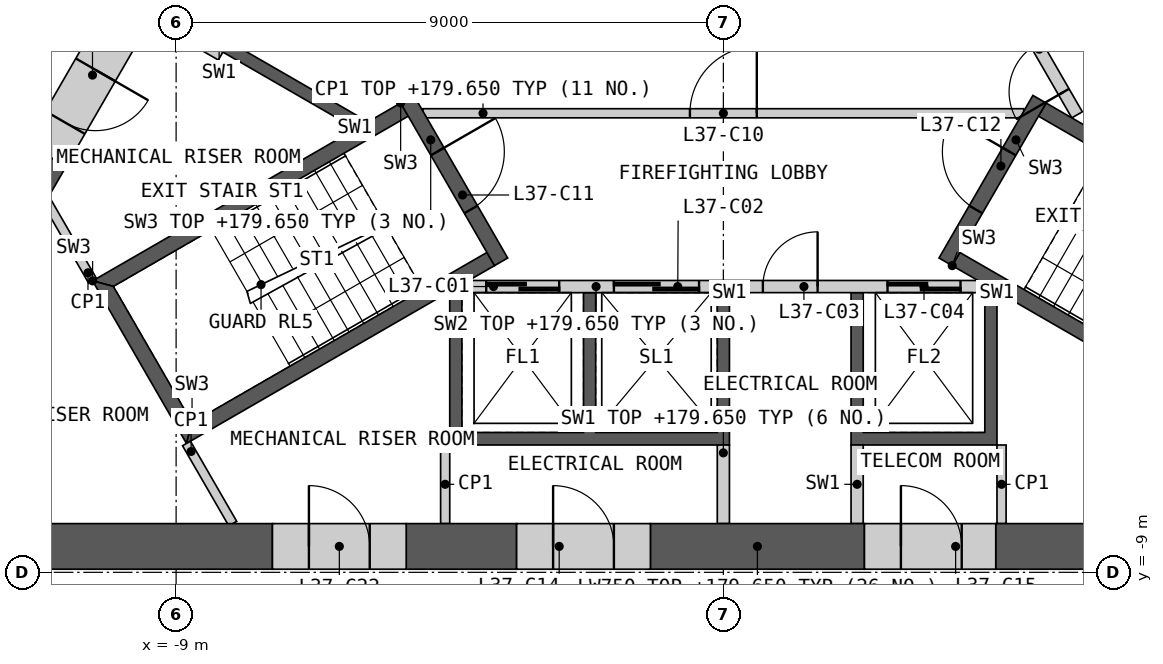
"""IFC4 building model, lengths in metres.
Left out: names, types, materials, properties, quantities, classifications, styles, units other than length and angle.
Written with IfcOpenShell. Run it as: python <this file> out.ifc"""

import sys

from ifc_helpers import new_model, si_unit, direction, frame, frame_2d, origin, place, context, subcontext, project, spatial, polyline, rectangle, outline, extrude, element, fill, save


model = new_model("IFC4")
c1 = context("Model", 3, precision=1e-05, world=origin(), true_north=direction((0.0, 1.0)))
c2 = subcontext(c1, "Body", "Model", "MODEL_VIEW")
j1 = project(units=[si_unit("LENGTHUNIT", "METRE"), si_unit("PLANEANGLEUNIT", "RADIAN")], contexts=[c1])
p1 = place(None, origin())
s1 = spatial("IfcSite", under=j1, at=p1, CompositionType="ELEMENT")
p2 = place(p1, origin())
s2 = spatial("IfcBuilding", under=s1, at=p2, CompositionType="ELEMENT")
p3 = place(p2, frame((0.0, 0.0, 176.4)))
s3 = spatial("IfcBuildingStorey", under=s2, at=p3, CompositionType="ELEMENT", Elevation=176.4)
p4 = place(p3, origin())
e1 = element("IfcWall", 1, at=p4, inside=s3, PredefinedType="SHEAR", context=c2, shape_type="SweptSolid", body=[
    extrude(outline(polyline([(4.5, -4.4), (4.5, -6.906), (2.1, -6.906), (2.1, -4.4), (2.3, -4.4), (2.3, -6.7), (4.3, -6.7), (4.3, -4.4), (4.5, -4.4)])), origin(), (0.0, 0.0, 1.0), 3.25),
])
p5 = place(p3, origin())
e2 = element("IfcWall", 2, at=p5, inside=s3, PredefinedType="SHEAR", context=c2, shape_type="SweptSolid", body=[
    extrude(outline(polyline([(0.1, -4.4), (0.1, -6.906), (-4.5, -6.906), (-4.5, -4.4), (-4.3, -4.4), (-4.3, -6.7), (-2.3, -6.7), (-2.3, -4.4), (-2.1, -4.4), (-2.1, -6.7), (-0.1, -6.7), (-0.1, -4.4), (0.1, -4.4)])), origin(), (0.0, 0.0, 1.0), 3.25),
])
p6 = place(p3, frame((-4.187, -4.3, 0.0), z_axis=(0.0, 0.0, 1.0), x_axis=(1.0, 0.0, 0.0)))
e3 = element("IfcWall", 3, at=p6, inside=s3, PredefinedType="SOLIDWALL", context=c2, shape_type="SweptSolid", body=[
    extrude(rectangle(XDim=8.373, YDim=0.2, at=frame_2d((4.187, 0.0))), origin(), (0.0, 0.0, 1.0), 3.25),
])
p7 = place(p6, frame((0.287, 0.0, 0.0)))
e4 = element("IfcOpeningElement", 4, at=p7, cuts=e3, PredefinedType="OPENING", context=c2, shape_type="SweptSolid", body=[
    extrude(rectangle(XDim=1.2, YDim=2.1, at=frame_2d((0.6, 1.05))), frame((0.0, 0.11, 0.0), z_axis=(0.0, -1.0, 0.0), x_axis=(1.0, 0.0, 0.0)), (0.0, 0.0, 1.0), 0.22),
])
p8 = place(p6, frame((2.387, 0.0, 0.0)))
e5 = element("IfcOpeningElement", 5, at=p8, cuts=e3, PredefinedType="OPENING", context=c2, shape_type="SweptSolid", body=[
    extrude(rectangle(XDim=1.4, YDim=2.1, at=frame_2d((0.7, 1.05))), frame((0.0, 0.11, 0.0), z_axis=(0.0, -1.0, 0.0), x_axis=(1.0, 0.0, 0.0)), (0.0, 0.0, 1.0), 0.22),
])
p9 = place(p6, frame((4.837, 0.0, 0.0)))
e6 = element("IfcOpeningElement", 6, at=p9, cuts=e3, PredefinedType="OPENING", context=c2, shape_type="SweptSolid", body=[
    extrude(rectangle(XDim=0.9, YDim=2.1, at=frame_2d((0.45, 1.05))), frame((0.0, 0.11, 0.0), z_axis=(0.0, -1.0, 0.0), x_axis=(1.0, 0.0, 0.0)), (0.0, 0.0, 1.0), 0.22),
])
p10 = place(p6, frame((6.887, 0.0, 0.0)))
e7 = element("IfcOpeningElement", 7, at=p10, cuts=e3, PredefinedType="OPENING", context=c2, shape_type="SweptSolid", body=[
    extrude(rectangle(XDim=1.2, YDim=2.1, at=frame_2d((0.6, 1.05))), frame((0.0, 0.11, 0.0), z_axis=(0.0, -1.0, 0.0), x_axis=(1.0, 0.0, 0.0)), (0.0, 0.0, 1.0), 0.22),
])
for number, where, z_axis, x_axis in (
    (8, (0.0, -6.906, 0.0), (0.0, 0.0, 1.0), (0.0, -1.0, 0.0)),
    (9, (2.2, -6.906, 0.0), (0.0, 0.0, 1.0), (0.0, -1.0, 0.0)),
):
    element("IfcWall", number, at=place(p3, frame(where, z_axis=z_axis, x_axis=x_axis)), inside=s3, PredefinedType="SHEAR", context=c2, shape_type="SweptSolid", body=[
        extrude(rectangle(XDim=1.293, YDim=0.2, at=frame_2d((0.646, 0.0))), origin(), (0.0, 0.0, 1.0), 3.25),
    ])
p11 = place(p3, frame((5.817, -1.476, 0.0), z_axis=(0.0, 0.0, 1.0), x_axis=(-0.500002616675, 0.866023893041, 0.0)))
e10 = element("IfcWall", 10, at=p11, inside=s3, PredefinedType="SOLIDWALL", context=c2, shape_type="SweptSolid", body=[
    extrude(rectangle(XDim=8.373, YDim=0.2, at=frame_2d((4.187, 0.0))), origin(), (0.0, 0.0, 1.0), 3.25),
])
p12 = place(p11, frame((0.437, 0.0, 0.0)))
e11 = element("IfcOpeningElement", 11, at=p12, cuts=e10, PredefinedType="OPENING", context=c2, shape_type="SweptSolid", body=[
    extrude(rectangle(XDim=0.9, YDim=2.1, at=frame_2d((0.45, 1.05))), frame((0.0, 0.11, 0.0), z_axis=(0.0, -1.0, 0.0), x_axis=(1.0, 0.0, 0.0)), (0.0, 0.0, 1.0), 0.22),
])
p13 = place(p11, frame((3.737, 0.0, 0.0)))
e12 = element("IfcOpeningElement", 12, at=p13, cuts=e10, PredefinedType="OPENING", context=c2, shape_type="SweptSolid", body=[
    extrude(rectangle(XDim=0.9, YDim=2.1, at=frame_2d((0.45, 1.05))), frame((0.0, 0.11, 0.0), z_axis=(0.0, -1.0, 0.0), x_axis=(1.0, 0.0, 0.0)), (0.0, 0.0, 1.0), 0.22),
])
p14 = place(p11, frame((6.937, 0.0, 0.0)))
e13 = element("IfcOpeningElement", 13, at=p14, cuts=e10, PredefinedType="OPENING", context=c2, shape_type="SweptSolid", body=[
    extrude(rectangle(XDim=1.1, YDim=2.1, at=frame_2d((0.55, 1.05))), frame((0.0, 0.11, 0.0), z_axis=(0.0, -1.0, 0.0), x_axis=(1.0, 0.0, 0.0)), (0.0, 0.0, 1.0), 0.22),
])
p15 = place(p3, origin())
e14 = element("IfcWall", 14, at=p15, inside=s3, PredefinedType="SHEAR", context=c2, shape_type="SweptSolid", body=[
    extrude(outline(polyline([(-6.061, -1.697), (-8.231, -0.444), (-8.131, -0.271), (-5.96, -1.524), (-6.061, -1.697)])), origin(), (0.0, 0.0, 1.0), 3.25),
])
p16 = place(p3, frame((-4.941, -1.45, 0.0), z_axis=(0.0, 0.0, 1.0), x_axis=(1.0, 0.0, 0.0)))
e15 = element("IfcWall", 15, at=p16, inside=s3, PredefinedType="PARTITIONING", context=c2, shape_type="SweptSolid", body=[
    extrude(rectangle(XDim=9.882, YDim=0.15, at=frame_2d((4.941, 0.0))), origin(), (0.0, 0.0, 1.0), 3.25),
])
p17 = place(p16, frame((4.391, 0.0, 0.0)))
e16 = element("IfcOpeningElement", 16, at=p17, cuts=e15, PredefinedType="OPENING", context=c2, shape_type="SweptSolid", body=[
    extrude(rectangle(XDim=1.1, YDim=2.1, at=frame_2d((0.55, 1.05))), frame((0.0, 0.085, 0.0), z_axis=(0.0, -1.0, 0.0), x_axis=(1.0, 0.0, 0.0)), (0.0, 0.0, 1.0), 0.17),
])
p18 = place(p3, origin())
e17 = element("IfcWall", 17, at=p18, inside=s3, PredefinedType="SHEAR", context=c2, shape_type="SweptSolid", body=[
    extrude(outline(polyline([(-5.307, -1.281), (-10.374, -4.206), (-10.032, -4.298), (-5.182, -1.498), (-5.307, -1.281)])), origin(), (0.0, 0.0, 1.0), 3.25),
])
p19 = place(p3, origin())
e18 = element("IfcWall", 18, at=p19, inside=s3, PredefinedType="SHEAR", context=c2, shape_type="SweptSolid", body=[
    extrude(outline(polyline([(-10.374, -4.206), (-8.83, -6.881), (-8.738, -6.539), (-10.032, -4.298), (-10.374, -4.206)])), origin(), (0.0, 0.0, 1.0), 3.25),
])
p20 = place(p3, origin())
e19 = element("IfcWall", 19, at=p20, inside=s3, PredefinedType="SHEAR", context=c2, shape_type="SweptSolid", body=[
    extrude(outline(polyline([(-8.738, -6.539), (-8.83, -6.881), (-3.763, -3.956), (-3.888, -3.739), (-8.738, -6.539)])), origin(), (0.0, 0.0, 1.0), 3.25),
])
p21 = place(p3, frame((-5.199, -1.219, 0.0), z_axis=(0.0, 0.0, 1.0), x_axis=(0.499982516597, -0.866035497597, 0.0)))
e20 = element("IfcWall", 20, at=p21, inside=s3, PredefinedType="SHEAR", context=c2, shape_type="SweptSolid", body=[
    extrude(rectangle(XDim=3.088, YDim=0.25, at=frame_2d((1.544, 0.0))), origin(), (0.0, 0.0, 1.0), 3.25),
])
p22 = place(p21, frame((0.994, 0.0, 0.0)))
e21 = element("IfcOpeningElement", 21, at=p22, cuts=e20, PredefinedType="OPENING", context=c2, shape_type="SweptSolid", body=[
    extrude(rectangle(XDim=1.1, YDim=2.1, at=frame_2d((0.55, 1.05))), frame((0.0, 0.135, 0.0), z_axis=(0.0, -1.0, 0.0), x_axis=(1.0, 0.0, 0.0)), (0.0, 0.0, 1.0), 0.27),
])
p23 = place(p3, origin())
e22 = element("IfcWall", 22, at=p23, inside=s3, PredefinedType="SHEAR", context=c2, shape_type="SweptSolid", body=[
    extrude(outline(polyline([(3.763, -3.956), (8.83, -6.881), (8.738, -6.539), (3.888, -3.739), (3.763, -3.956)])), origin(), (0.0, 0.0, 1.0), 3.25),
])
p24 = place(p3, origin())
e23 = element("IfcWall", 23, at=p24, inside=s3, PredefinedType="SHEAR", context=c2, shape_type="SweptSolid", body=[
    extrude(outline(polyline([(10.032, -4.298), (10.374, -4.206), (5.307, -1.281), (5.182, -1.498), (10.032, -4.298)])), origin(), (0.0, 0.0, 1.0), 3.25),
])
p25 = place(p3, frame((3.655, -3.893, 0.0), z_axis=(0.0, 0.0, 1.0), x_axis=(0.499982516597, 0.866035497597, 0.0)))
e24 = element("IfcWall", 24, at=p25, inside=s3, PredefinedType="SHEAR", context=c2, shape_type="SweptSolid", body=[
    extrude(rectangle(XDim=3.088, YDim=0.25, at=frame_2d((1.544, 0.0))), origin(), (0.0, 0.0, 1.0), 3.25),
])
p26 = place(p25, frame((0.994, 0.0, 0.0)))
e25 = element("IfcOpeningElement", 25, at=p26, cuts=e24, PredefinedType="OPENING", context=c2, shape_type="SweptSolid", body=[
    extrude(rectangle(XDim=1.1, YDim=2.1, at=frame_2d((0.55, 1.05))), frame((0.0, 0.135, 0.0), z_axis=(0.0, -1.0, 0.0), x_axis=(1.0, 0.0, 0.0)), (0.0, 0.0, 1.0), 0.27),
])
for number, where, z_axis, x_axis in (
    (26, (4.575, -6.906, 0.0), (0.0, 0.0, 1.0), (0.0, -1.0, 0.0)),
    (27, (-4.575, -6.906, 0.0), (0.0, 0.0, 1.0), (0.0, -1.0, 0.0)),
    (28, (-8.268, -0.509, 0.0), (0.0, 0.0, 1.0), (-0.866, 0.5, 0.0)),
):
    element("IfcWall", number, at=place(p3, frame(where, z_axis=z_axis, x_axis=x_axis)), inside=s3, PredefinedType="PARTITIONING", context=c2, shape_type="SweptSolid", body=[
        extrude(rectangle(XDim=1.293, YDim=0.15, at=frame_2d((0.646, 0.0))), origin(), (0.0, 0.0, 1.0), 3.25),
    ])
for number, where, z_axis, x_axis in (
    (29, (-8.83, -6.881, 0.0), (0.0, 0.0, 1.0), (0.5, -0.866, 0.0)),
    (30, (-10.374, -4.206, 0.0), (0.0, 0.0, 1.0), (-0.5, 0.866, 0.0)),
):
    element("IfcWall", number, at=place(p3, frame(where, z_axis=z_axis, x_axis=x_axis)), inside=s3, PredefinedType="PARTITIONING", context=c2, shape_type="SweptSolid", body=[
        extrude(rectangle(XDim=1.522, YDim=0.15, at=frame_2d((0.761, 0.0))), origin(), (0.0, 0.0, 1.0), 3.25),
    ])
p27 = place(p3, frame((-14.201, -8.574, 0.0), z_axis=(0.0, 0.0, 1.0), x_axis=(1.0, 0.0, 0.0)))
e31 = element("IfcWall", 31, at=p27, inside=s3, PredefinedType="SHEAR", context=c2, shape_type="SweptSolid", body=[
    extrude(rectangle(XDim=6.785, YDim=0.75, at=frame_2d((3.393, 0.0))), origin(), (0.0, 0.0, 1.0), 3.25),
])
p28 = place(p3, frame((4.48, -8.574, 0.0), z_axis=(0.0, 0.0, 1.0), x_axis=(1.0, 0.0, 0.0)))
e32 = element("IfcWall", 32, at=p28, inside=s3, PredefinedType="SHEAR", context=c2, shape_type="SweptSolid", body=[
    extrude(rectangle(XDim=3.845, YDim=0.75, at=frame_2d((1.923, 0.0))), origin(), (0.0, 0.0, 1.0), 3.25),
])
p29 = place(p3, frame((-1.2, -8.574, 0.0), z_axis=(0.0, 0.0, 1.0), x_axis=(1.0, 0.0, 0.0)))
e33 = element("IfcWall", 33, at=p29, inside=s3, PredefinedType="SHEAR", context=c2, shape_type="SweptSolid", body=[
    extrude(rectangle(XDim=3.52, YDim=0.75, at=frame_2d((1.76, 0.0))), origin(), (0.0, 0.0, 1.0), 3.25),
])
p30 = place(p3, frame((-5.216, -8.574, 0.0), z_axis=(0.0, 0.0, 1.0), x_axis=(1.0, 0.0, 0.0)))
e34 = element("IfcWall", 34, at=p30, inside=s3, PredefinedType="SHEAR", context=c2, shape_type="SweptSolid", body=[
    extrude(rectangle(XDim=1.816, YDim=0.75, at=frame_2d((0.908, 0.0))), origin(), (0.0, 0.0, 1.0), 3.25),
])
p31 = place(p3, frame((-11.133, -2.135, 0.0), z_axis=(0.0, 0.0, 1.0), x_axis=(-0.499936812382, -0.866061882099, 0.0)))
e35 = element("IfcWall", 35, at=p31, inside=s3, PredefinedType="SHEAR", context=c2, shape_type="SweptSolid", body=[
    extrude(rectangle(XDim=2.662, YDim=0.75, at=frame_2d((1.331, 0.0))), origin(), (0.0, 0.0, 1.0), 3.25),
])
p32 = place(p3, frame((-3.4, -8.574, 0.0), z_axis=(0.0, 0.0, 1.0), x_axis=(1.0, 0.0, 0.0)))
e36 = element("IfcWall", 36, at=p32, inside=s3, PredefinedType="SHEAR", context=c2, shape_type="SweptSolid", body=[
    extrude(rectangle(XDim=2.2, YDim=0.75, at=frame_2d((1.1, 0.0))), origin(), (0.0, 0.0, 1.0), 3.25),
])
p33 = place(p32, frame((0.6, 0.0, 0.0)))
e37 = element("IfcOpeningElement", 37, at=p33, cuts=e36, PredefinedType="OPENING", context=c2, shape_type="SweptSolid", body=[
    extrude(rectangle(XDim=1.0, YDim=2.1, at=frame_2d((0.5, 1.05))), frame((0.0, 0.385, 0.0), z_axis=(0.0, -1.0, 0.0), x_axis=(1.0, 0.0, 0.0)), (0.0, 0.0, 1.0), 0.77),
])
p34 = place(p3, frame((2.32, -8.574, 0.0), z_axis=(0.0, 0.0, 1.0), x_axis=(1.0, 0.0, 0.0)))
e38 = element("IfcWall", 38, at=p34, inside=s3, PredefinedType="SHEAR", context=c2, shape_type="SweptSolid", body=[
    extrude(rectangle(XDim=2.16, YDim=0.75, at=frame_2d((1.08, 0.0))), origin(), (0.0, 0.0, 1.0), 3.25),
])
p35 = place(p34, frame((0.6, 0.0, 0.0)))
e39 = element("IfcOpeningElement", 39, at=p35, cuts=e38, PredefinedType="OPENING", context=c2, shape_type="SweptSolid", body=[
    extrude(rectangle(XDim=1.0, YDim=2.1, at=frame_2d((0.5, 1.05))), frame((0.0, 0.385, 0.0), z_axis=(0.0, -1.0, 0.0), x_axis=(1.0, 0.0, 0.0)), (0.0, 0.0, 1.0), 0.77),
])
p36 = place(p3, frame((-9.625, 0.477, 0.0), z_axis=(0.0, 0.0, 1.0), x_axis=(-0.499995718215, -0.86602787586, 0.0)))
e40 = element("IfcWall", 40, at=p36, inside=s3, PredefinedType="SHEAR", context=c2, shape_type="SweptSolid", body=[
    extrude(rectangle(XDim=3.016, YDim=0.75, at=frame_2d((1.508, 0.0))), origin(), (0.0, 0.0, 1.0), 3.25),
])
p37 = place(p36, frame((1.4, 0.0, 0.0)))
e41 = element("IfcOpeningElement", 41, at=p37, cuts=e40, PredefinedType="OPENING", context=c2, shape_type="SweptSolid", body=[
    extrude(rectangle(XDim=1.0, YDim=2.1, at=frame_2d((0.5, 1.05))), frame((0.0, 0.385, 0.0), z_axis=(0.0, -1.0, 0.0), x_axis=(1.0, 0.0, 0.0)), (0.0, 0.0, 1.0), 0.77),
])
p38 = place(p3, frame((-7.416, -8.574, 0.0), z_axis=(0.0, 0.0, 1.0), x_axis=(1.0, 0.0, 0.0)))
e42 = element("IfcWall", 42, at=p38, inside=s3, PredefinedType="SHEAR", context=c2, shape_type="SweptSolid", body=[
    extrude(rectangle(XDim=2.2, YDim=0.75, at=frame_2d((1.1, 0.0))), origin(), (0.0, 0.0, 1.0), 3.25),
])
p39 = place(p38, frame((0.6, 0.0, 0.0)))
e43 = element("IfcOpeningElement", 43, at=p39, cuts=e42, PredefinedType="OPENING", context=c2, shape_type="SweptSolid", body=[
    extrude(rectangle(XDim=1.0, YDim=2.1, at=frame_2d((0.5, 1.05))), frame((0.0, 0.385, 0.0), z_axis=(0.0, -1.0, 0.0), x_axis=(1.0, 0.0, 0.0)), (0.0, 0.0, 1.0), 0.77),
])
p40 = place(p3, frame((-14.619, -2.624, 0.0), z_axis=(0.0, 0.0, 1.0), x_axis=(0.50000393355, 0.866023132736, 0.0)))
e44 = element("IfcWall", 44, at=p40, inside=s3, PredefinedType="PARTITIONING", context=c2, shape_type="SweptSolid", body=[
    extrude(rectangle(XDim=9.335, YDim=0.2, at=frame_2d((4.667, 0.0))), origin(), (0.0, 0.0, 1.0), 3.25),
])
p41 = place(p40, frame((3.163, 0.0, 0.0)))
e45 = element("IfcOpeningElement", 45, at=p41, cuts=e44, PredefinedType="OPENING", context=c2, shape_type="SweptSolid", body=[
    extrude(rectangle(XDim=1.0, YDim=2.1, at=frame_2d((0.5, 1.05))), frame((0.0, 0.11, 0.0), z_axis=(0.0, -1.0, 0.0), x_axis=(1.0, 0.0, 0.0)), (0.0, 0.0, 1.0), 0.22),
])
p42 = place(p7, origin())
e46 = element("IfcDoor", 46, at=p42, inside=s3, OperationType="SLIDING_TO_LEFT", PredefinedType="DOOR", context=c2, shape_type="SweptSolid", body=[
    extrude(rectangle(XDim=1.2, YDim=2.1, at=frame_2d((0.6, 1.05))), frame((0.0, 0.025, 0.0), z_axis=(0.0, -1.0, 0.0), x_axis=(1.0, 0.0, 0.0)), (0.0, 0.0, 1.0), 0.05),
])
fill(e4, e46)
p43 = place(p8, origin())
e47 = element("IfcDoor", 47, at=p43, inside=s3, OperationType="SLIDING_TO_LEFT", PredefinedType="DOOR", context=c2, shape_type="SweptSolid", body=[
    extrude(rectangle(XDim=1.4, YDim=2.1, at=frame_2d((0.7, 1.05))), frame((0.0, 0.025, 0.0), z_axis=(0.0, -1.0, 0.0), x_axis=(1.0, 0.0, 0.0)), (0.0, 0.0, 1.0), 0.05),
])
fill(e5, e47)
p44 = place(p9, origin())
e48 = element("IfcDoor", 48, at=p44, inside=s3, OperationType="SINGLE_SWING_RIGHT", PredefinedType="DOOR", context=c2, shape_type="SweptSolid", body=[
    extrude(rectangle(XDim=0.9, YDim=2.1, at=frame_2d((0.45, 1.05))), frame((0.0, 0.025, 0.0), z_axis=(0.0, -1.0, 0.0), x_axis=(1.0, 0.0, 0.0)), (0.0, 0.0, 1.0), 0.05),
])
fill(e6, e48)
p45 = place(p10, origin())
e49 = element("IfcDoor", 49, at=p45, inside=s3, OperationType="SLIDING_TO_LEFT", PredefinedType="DOOR", context=c2, shape_type="SweptSolid", body=[
    extrude(rectangle(XDim=1.2, YDim=2.1, at=frame_2d((0.6, 1.05))), frame((0.0, 0.025, 0.0), z_axis=(0.0, -1.0, 0.0), x_axis=(1.0, 0.0, 0.0)), (0.0, 0.0, 1.0), 0.05),
])
fill(e7, e49)
p46 = place(p12, origin())
e50 = element("IfcDoor", 50, at=p46, inside=s3, OperationType="SINGLE_SWING_LEFT", PredefinedType="DOOR", context=c2, shape_type="SweptSolid", body=[
    extrude(rectangle(XDim=0.9, YDim=2.1, at=frame_2d((0.45, 1.05))), frame((0.0, 0.025, 0.0), z_axis=(0.0, -1.0, 0.0), x_axis=(1.0, 0.0, 0.0)), (0.0, 0.0, 1.0), 0.05),
])
fill(e11, e50)
p47 = place(p17, origin())
e51 = element("IfcDoor", 51, at=p47, inside=s3, OperationType="SINGLE_SWING_RIGHT", PredefinedType="DOOR", context=c2, shape_type="SweptSolid", body=[
    extrude(rectangle(XDim=1.1, YDim=2.1, at=frame_2d((0.55, 1.05))), frame((0.0, 0.025, 0.0), z_axis=(0.0, -1.0, 0.0), x_axis=(1.0, 0.0, 0.0)), (0.0, 0.0, 1.0), 0.05),
])
fill(e16, e51)
p48 = place(p22, origin())
e52 = element("IfcDoor", 52, at=p48, inside=s3, OperationType="SINGLE_SWING_LEFT", PredefinedType="DOOR", context=c2, shape_type="SweptSolid", body=[
    extrude(rectangle(XDim=1.1, YDim=2.1, at=frame_2d((0.55, 1.05))), frame((0.0, 0.025, 0.0), z_axis=(0.0, -1.0, 0.0), x_axis=(1.0, 0.0, 0.0)), (0.0, 0.0, 1.0), 0.05),
])
fill(e21, e52)
p49 = place(p26, origin())
e53 = element("IfcDoor", 53, at=p49, inside=s3, OperationType="SINGLE_SWING_RIGHT", PredefinedType="DOOR", context=c2, shape_type="SweptSolid", body=[
    extrude(rectangle(XDim=1.1, YDim=2.1, at=frame_2d((0.55, 1.05))), frame((0.0, 0.025, 0.0), z_axis=(0.0, -1.0, 0.0), x_axis=(1.0, 0.0, 0.0)), (0.0, 0.0, 1.0), 0.05),
])
fill(e25, e53)
p50 = place(p33, origin())
e54 = element("IfcDoor", 54, at=p50, inside=s3, OperationType="SINGLE_SWING_LEFT", PredefinedType="DOOR", context=c2, shape_type="SweptSolid", body=[
    extrude(rectangle(XDim=1.0, YDim=2.1, at=frame_2d((0.5, 1.05))), frame((0.0, 0.13, 0.0), z_axis=(0.0, -1.0, 0.0), x_axis=(1.0, 0.0, 0.0)), (0.0, 0.0, 1.0), 0.05),
])
fill(e37, e54)
p51 = place(p35, origin())
e55 = element("IfcDoor", 55, at=p51, inside=s3, OperationType="SINGLE_SWING_LEFT", PredefinedType="DOOR", context=c2, shape_type="SweptSolid", body=[
    extrude(rectangle(XDim=1.0, YDim=2.1, at=frame_2d((0.5, 1.05))), frame((0.0, 0.13, 0.0), z_axis=(0.0, -1.0, 0.0), x_axis=(1.0, 0.0, 0.0)), (0.0, 0.0, 1.0), 0.05),
])
fill(e39, e55)
p52 = place(p37, origin())
e56 = element("IfcDoor", 56, at=p52, inside=s3, OperationType="SINGLE_SWING_LEFT", PredefinedType="DOOR", context=c2, shape_type="SweptSolid", body=[
    extrude(rectangle(XDim=1.0, YDim=2.1, at=frame_2d((0.5, 1.05))), frame((0.0, 0.13, 0.0), z_axis=(0.0, -1.0, 0.0), x_axis=(1.0, 0.0, 0.0)), (0.0, 0.0, 1.0), 0.05),
])
fill(e41, e56)
p53 = place(p39, origin())
e57 = element("IfcDoor", 57, at=p53, inside=s3, OperationType="SINGLE_SWING_LEFT", PredefinedType="DOOR", context=c2, shape_type="SweptSolid", body=[
    extrude(rectangle(XDim=1.0, YDim=2.1, at=frame_2d((0.5, 1.05))), frame((0.0, 0.13, 0.0), z_axis=(0.0, -1.0, 0.0), x_axis=(1.0, 0.0, 0.0)), (0.0, 0.0, 1.0), 0.05),
])
fill(e43, e57)
save(model, sys.argv[1])
